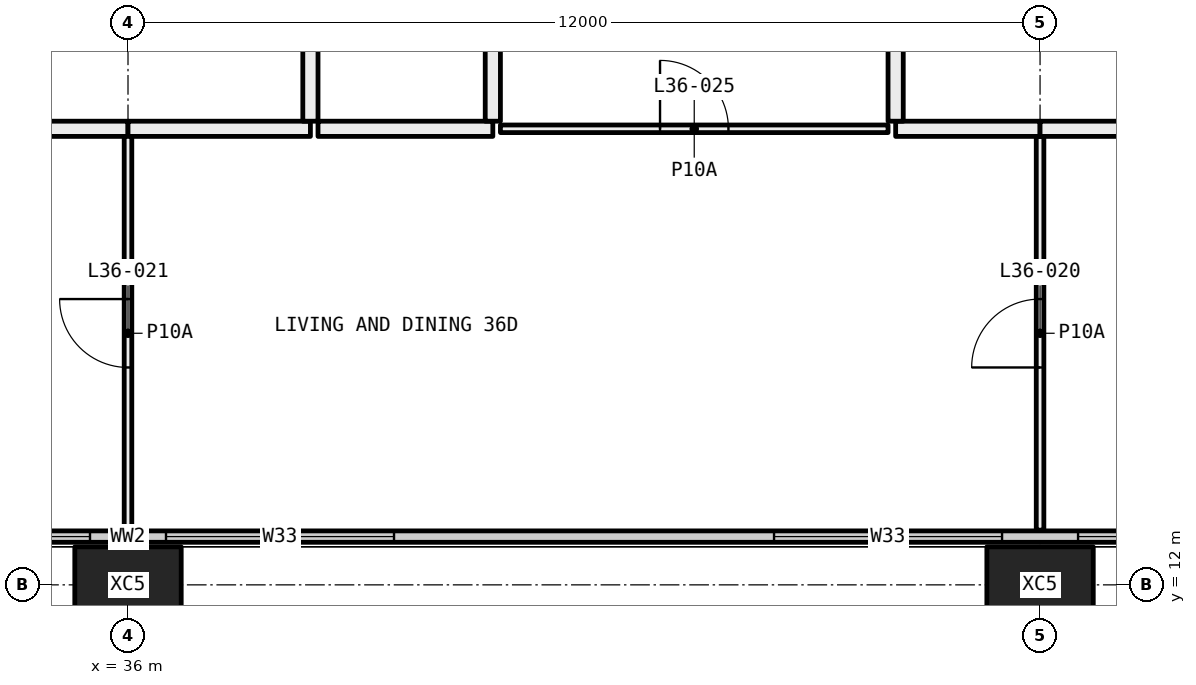
"""IFC4 building model, lengths in metres.
Left out: names, types, materials, properties, quantities, classifications, styles, units other than length and angle.
Written with IfcOpenShell. Run it as: python <this file> out.ifc"""

import sys

from ifc_helpers import new_model, si_unit, direction, frame, frame_2d, origin, origin_2d, place, context, subcontext, project, spatial, rectangle, hollow_rectangle, extrude, element, fill, save


model = new_model("IFC4")
c1 = context("Model", 3, precision=1e-05, world=origin(), true_north=direction((0.0, 1.0)))
c2 = subcontext(c1, "Body", "Model", "MODEL_VIEW")
j1 = project(units=[si_unit("LENGTHUNIT", "METRE"), si_unit("PLANEANGLEUNIT", "RADIAN")], contexts=[c1])
p1 = place(None, origin())
s1 = spatial("IfcSite", under=j1, at=p1, CompositionType="ELEMENT")
p2 = place(p1, origin())
s2 = spatial("IfcBuilding", under=s1, at=p2, CompositionType="ELEMENT")
p3 = place(p2, frame((0.0, 0.0, 138.0)))
s3 = spatial("IfcBuildingStorey", under=s2, at=p3, CompositionType="ELEMENT", Elevation=138.0)
for number, where, z_axis, x_axis in (
    (1, (36.0, 12.0, -0.4), (0.0, 0.0, 1.0), (1.0, 0.0, 0.0)),
    (2, (48.0, 12.0, -0.4), (0.0, 0.0, 1.0), (1.0, 0.0, 0.0)),
):
    element("IfcColumn", number, at=place(p3, frame(where, z_axis=z_axis, x_axis=x_axis)), inside=s3, PredefinedType="COLUMN", context=c2, shape_type="SweptSolid", body=[
        extrude(hollow_rectangle(XDim=1.4, YDim=1.0, WallThickness=0.055, at=origin_2d()), origin(), (0.0, 0.0, 1.0), 3.45),
    ])
p4 = place(p3, frame((6.56, 12.635, 0.0), z_axis=(0.0, 0.0, 1.0), x_axis=(1.0, 0.0, 0.0)))
e3 = element("IfcWall", 3, at=p4, inside=s3, PredefinedType="ELEMENTEDWALL", context=c2, shape_type="SweptSolid", body=[
    extrude(rectangle(XDim=58.88, YDim=0.15, at=frame_2d((29.44, 0.0))), origin(), (0.0, 0.0, 1.0), 3.05),
])
p5 = place(p4, frame((0.44, 0.0, 0.45)))
e4 = element("IfcOpeningElement", 4, at=p5, cuts=e3, PredefinedType="OPENING", context=c2, shape_type="SweptSolid", body=[
    extrude(rectangle(XDim=4.5, YDim=2.55, at=frame_2d((2.25, 1.275))), frame((0.0, 0.085, 0.0), z_axis=(0.0, -1.0, 0.0), x_axis=(1.0, 0.0, 0.0)), (0.0, 0.0, 1.0), 0.17),
])
p6 = place(p4, frame((5.94, 0.0, 0.45)))
e5 = element("IfcOpeningElement", 5, at=p6, cuts=e3, PredefinedType="OPENING", context=c2, shape_type="SweptSolid", body=[
    extrude(rectangle(XDim=3.0, YDim=2.55, at=frame_2d((1.5, 1.275))), frame((0.0, 0.085, 0.0), z_axis=(0.0, -1.0, 0.0), x_axis=(1.0, 0.0, 0.0)), (0.0, 0.0, 1.0), 0.17),
])
p7 = place(p4, frame((13.94, 0.0, 0.45)))
e6 = element("IfcOpeningElement", 6, at=p7, cuts=e3, PredefinedType="OPENING", context=c2, shape_type="SweptSolid", body=[
    extrude(rectangle(XDim=3.0, YDim=2.55, at=frame_2d((1.5, 1.275))), frame((0.0, 0.085, 0.0), z_axis=(0.0, -1.0, 0.0), x_axis=(1.0, 0.0, 0.0)), (0.0, 0.0, 1.0), 0.17),
])
p8 = place(p4, frame((17.94, 0.0, 0.45)))
e7 = element("IfcOpeningElement", 7, at=p8, cuts=e3, PredefinedType="OPENING", context=c2, shape_type="SweptSolid", body=[
    extrude(rectangle(XDim=3.0, YDim=2.55, at=frame_2d((1.5, 1.275))), frame((0.0, 0.085, 0.0), z_axis=(0.0, -1.0, 0.0), x_axis=(1.0, 0.0, 0.0)), (0.0, 0.0, 1.0), 0.17),
])
p9 = place(p4, frame((26.94, 0.0, 0.45)))
e8 = element("IfcOpeningElement", 8, at=p9, cuts=e3, PredefinedType="OPENING", context=c2, shape_type="SweptSolid", body=[
    extrude(rectangle(XDim=2.0, YDim=2.55, at=frame_2d((1.0, 1.275))), frame((0.0, 0.085, 0.0), z_axis=(0.0, -1.0, 0.0), x_axis=(1.0, 0.0, 0.0)), (0.0, 0.0, 1.0), 0.17),
])
p10 = place(p4, frame((29.94, 0.0, 0.45)))
e9 = element("IfcOpeningElement", 9, at=p10, cuts=e3, PredefinedType="OPENING", context=c2, shape_type="SweptSolid", body=[
    extrude(rectangle(XDim=3.0, YDim=2.55, at=frame_2d((1.5, 1.275))), frame((0.0, 0.085, 0.0), z_axis=(0.0, -1.0, 0.0), x_axis=(1.0, 0.0, 0.0)), (0.0, 0.0, 1.0), 0.17),
])
p11 = place(p4, frame((37.94, 0.0, 0.45)))
e10 = element("IfcOpeningElement", 10, at=p11, cuts=e3, PredefinedType="OPENING", context=c2, shape_type="SweptSolid", body=[
    extrude(rectangle(XDim=3.0, YDim=2.55, at=frame_2d((1.5, 1.275))), frame((0.0, 0.085, 0.0), z_axis=(0.0, -1.0, 0.0), x_axis=(1.0, 0.0, 0.0)), (0.0, 0.0, 1.0), 0.17),
])
p12 = place(p4, frame((41.94, 0.0, 0.45)))
e11 = element("IfcOpeningElement", 11, at=p12, cuts=e3, PredefinedType="OPENING", context=c2, shape_type="SweptSolid", body=[
    extrude(rectangle(XDim=3.0, YDim=2.55, at=frame_2d((1.5, 1.275))), frame((0.0, 0.085, 0.0), z_axis=(0.0, -1.0, 0.0), x_axis=(1.0, 0.0, 0.0)), (0.0, 0.0, 1.0), 0.17),
])
p13 = place(p4, frame((50.94, 0.0, 0.45)))
e12 = element("IfcOpeningElement", 12, at=p13, cuts=e3, PredefinedType="OPENING", context=c2, shape_type="SweptSolid", body=[
    extrude(rectangle(XDim=2.0, YDim=2.55, at=frame_2d((1.0, 1.275))), frame((0.0, 0.085, 0.0), z_axis=(0.0, -1.0, 0.0), x_axis=(1.0, 0.0, 0.0)), (0.0, 0.0, 1.0), 0.17),
])
p14 = place(p4, frame((53.94, 0.0, 0.45)))
e13 = element("IfcOpeningElement", 13, at=p14, cuts=e3, PredefinedType="OPENING", context=c2, shape_type="SweptSolid", body=[
    extrude(rectangle(XDim=4.5, YDim=2.55, at=frame_2d((2.25, 1.275))), frame((0.0, 0.085, 0.0), z_axis=(0.0, -1.0, 0.0), x_axis=(1.0, 0.0, 0.0)), (0.0, 0.0, 1.0), 0.17),
])
p15 = place(p3, frame((30.0, 18.0, 0.0), z_axis=(0.0, 0.0, 1.0), x_axis=(1.0, 0.0, 0.0)))
e14 = element("IfcWall", 14, at=p15, inside=s3, PredefinedType="PARTITIONING", context=c2, shape_type="SweptSolid", body=[
    extrude(rectangle(XDim=6.0, YDim=0.2, at=frame_2d((3.0, 0.0))), origin(), (0.0, 0.0, 1.0), 2.45),
])
p16 = place(p3, frame((36.0, 18.0, 0.0), z_axis=(0.0, 0.0, 1.0), x_axis=(1.0, 0.0, 0.0)))
e15 = element("IfcWall", 15, at=p16, inside=s3, PredefinedType="PARTITIONING", context=c2, shape_type="SweptSolid", body=[
    extrude(rectangle(XDim=2.4, YDim=0.2, at=frame_2d((1.2, 0.0))), origin(), (0.0, 0.0, 1.0), 2.45),
])
p17 = place(p3, frame((38.4, 18.1, 0.0), z_axis=(0.0, 0.0, 1.0), x_axis=(0.0, 1.0, 0.0)))
e16 = element("IfcWall", 16, at=p17, inside=s3, PredefinedType="PARTITIONING", context=c2, shape_type="SweptSolid", body=[
    extrude(rectangle(XDim=6.2, YDim=0.2, at=frame_2d((3.1, 0.0))), origin(), (0.0, 0.0, 1.0), 2.45),
])
p18 = place(p3, frame((36.0, 12.72, 0.0), z_axis=(0.0, 0.0, 1.0), x_axis=(0.0, 1.0, 0.0)))
e17 = element("IfcWall", 17, at=p18, inside=s3, PredefinedType="PARTITIONING", context=c2, shape_type="SweptSolid", body=[
    extrude(rectangle(XDim=5.18, YDim=0.1, at=frame_2d((2.59, 0.0))), origin(), (0.0, 0.0, 1.0), 2.45),
])
p19 = place(p18, frame((2.14, 0.0, 0.0)))
e18 = element("IfcOpeningElement", 18, at=p19, cuts=e17, PredefinedType="OPENING", context=c2, shape_type="SweptSolid", body=[
    extrude(rectangle(XDim=0.9, YDim=2.1, at=frame_2d((0.45, 1.05))), frame((0.0, 0.06, 0.0), z_axis=(0.0, -1.0, 0.0), x_axis=(1.0, 0.0, 0.0)), (0.0, 0.0, 1.0), 0.12),
])
p20 = place(p3, frame((48.0, 12.72, 0.0), z_axis=(0.0, 0.0, 1.0), x_axis=(0.0, 1.0, 0.0)))
e19 = element("IfcWall", 19, at=p20, inside=s3, PredefinedType="PARTITIONING", context=c2, shape_type="SweptSolid", body=[
    extrude(rectangle(XDim=5.18, YDim=0.1, at=frame_2d((2.59, 0.0))), origin(), (0.0, 0.0, 1.0), 3.05),
])
p21 = place(p20, frame((2.14, 0.0, 0.0)))
e20 = element("IfcOpeningElement", 20, at=p21, cuts=e19, PredefinedType="OPENING", context=c2, shape_type="SweptSolid", body=[
    extrude(rectangle(XDim=0.9, YDim=2.1, at=frame_2d((0.45, 1.05))), frame((0.0, 0.06, 0.0), z_axis=(0.0, -1.0, 0.0), x_axis=(1.0, 0.0, 0.0)), (0.0, 0.0, 1.0), 0.12),
])
p22 = place(p3, frame((46.0, 18.0, 0.0), z_axis=(0.0, 0.0, 1.0), x_axis=(-1.0, 0.0, 0.0)))
e21 = element("IfcWall", 21, at=p22, inside=s3, PredefinedType="PARTITIONING", context=c2, shape_type="SweptSolid", body=[
    extrude(rectangle(XDim=5.1, YDim=0.1, at=frame_2d((2.55, 0.0))), origin(), (0.0, 0.0, 1.0), 3.05),
])
p23 = place(p22, frame((2.1, 0.0, 0.0)))
e22 = element("IfcOpeningElement", 22, at=p23, cuts=e21, PredefinedType="OPENING", context=c2, shape_type="SweptSolid", body=[
    extrude(rectangle(XDim=0.9, YDim=2.1, at=frame_2d((0.45, 1.05))), frame((0.0, 0.06, 0.0), z_axis=(0.0, -1.0, 0.0), x_axis=(1.0, 0.0, 0.0)), (0.0, 0.0, 1.0), 0.12),
])
p24 = place(p3, frame((40.8, 18.0, 0.0), z_axis=(0.0, 0.0, 1.0), x_axis=(-1.0, 0.0, 0.0)))
e23 = element("IfcWall", 23, at=p24, inside=s3, PredefinedType="PARTITIONING", context=c2, shape_type="SweptSolid", body=[
    extrude(rectangle(XDim=2.3, YDim=0.2, at=frame_2d((1.15, 0.0))), origin(), (0.0, 0.0, 1.0), 3.05),
])
p25 = place(p3, frame((48.0, 18.0, 0.0), z_axis=(0.0, 0.0, 1.0), x_axis=(-1.0, 0.0, 0.0)))
e24 = element("IfcWall", 24, at=p25, inside=s3, PredefinedType="PARTITIONING", context=c2, shape_type="SweptSolid", body=[
    extrude(rectangle(XDim=1.9, YDim=0.2, at=frame_2d((0.95, 0.0))), origin(), (0.0, 0.0, 1.0), 3.05),
])
p26 = place(p3, frame((54.0, 18.0, 0.0), z_axis=(0.0, 0.0, 1.0), x_axis=(-1.0, 0.0, 0.0)))
e25 = element("IfcWall", 25, at=p26, inside=s3, PredefinedType="PARTITIONING", context=c2, shape_type="SweptSolid", body=[
    extrude(rectangle(XDim=6.0, YDim=0.2, at=frame_2d((3.0, 0.0))), origin(), (0.0, 0.0, 1.0), 3.05),
])
p27 = place(p26, frame((2.5, 0.0, 0.0)))
e26 = element("IfcOpeningElement", 26, at=p27, cuts=e25, PredefinedType="OPENING", context=c2, shape_type="SweptSolid", body=[
    extrude(rectangle(XDim=1.0, YDim=2.1, at=frame_2d((0.5, 1.05))), frame((0.0, 0.11, 0.0), z_axis=(0.0, -1.0, 0.0), x_axis=(1.0, 0.0, 0.0)), (0.0, 0.0, 1.0), 0.22),
])
p28 = place(p3, frame((40.8, 23.9, 0.0), z_axis=(0.0, 0.0, 1.0), x_axis=(0.0, -1.0, 0.0)))
e27 = element("IfcWall", 27, at=p28, inside=s3, PredefinedType="PARTITIONING", context=c2, shape_type="SweptSolid", body=[
    extrude(rectangle(XDim=5.8, YDim=0.2, at=frame_2d((2.9, 0.0))), origin(), (0.0, 0.0, 1.0), 3.05),
])
p29 = place(p3, frame((46.1, 18.1, 0.0), z_axis=(0.0, 0.0, 1.0), x_axis=(0.0, 1.0, 0.0)))
e28 = element("IfcWall", 28, at=p29, inside=s3, PredefinedType="PARTITIONING", context=c2, shape_type="SweptSolid", body=[
    extrude(rectangle(XDim=6.2, YDim=0.2, at=frame_2d((3.1, 0.0))), origin(), (0.0, 0.0, 1.0), 2.45),
])
p30 = place(p9, origin())
e29 = element("IfcWindow", 29, at=p30, inside=s3, PartitioningType="SINGLE_PANEL", PredefinedType="WINDOW", context=c2, shape_type="SweptSolid", body=[
    extrude(rectangle(XDim=2.0, YDim=2.55, at=frame_2d((1.0, 1.275))), frame((0.0, 0.03, 0.0), z_axis=(0.0, -1.0, 0.0), x_axis=(1.0, 0.0, 0.0)), (0.0, 0.0, 1.0), 0.06),
])
fill(e8, e29)
p31 = place(p10, origin())
e30 = element("IfcWindow", 30, at=p31, inside=s3, PartitioningType="SINGLE_PANEL", PredefinedType="WINDOW", context=c2, shape_type="SweptSolid", body=[
    extrude(rectangle(XDim=3.0, YDim=2.55, at=frame_2d((1.5, 1.275))), frame((0.0, 0.03, 0.0), z_axis=(0.0, -1.0, 0.0), x_axis=(1.0, 0.0, 0.0)), (0.0, 0.0, 1.0), 0.06),
])
fill(e9, e30)
p32 = place(p11, origin())
e31 = element("IfcWindow", 31, at=p32, inside=s3, PartitioningType="SINGLE_PANEL", PredefinedType="WINDOW", context=c2, shape_type="SweptSolid", body=[
    extrude(rectangle(XDim=3.0, YDim=2.55, at=frame_2d((1.5, 1.275))), frame((0.0, 0.03, 0.0), z_axis=(0.0, -1.0, 0.0), x_axis=(1.0, 0.0, 0.0)), (0.0, 0.0, 1.0), 0.06),
])
fill(e10, e31)
p33 = place(p12, origin())
e32 = element("IfcWindow", 32, at=p33, inside=s3, PartitioningType="SINGLE_PANEL", PredefinedType="WINDOW", context=c2, shape_type="SweptSolid", body=[
    extrude(rectangle(XDim=3.0, YDim=2.55, at=frame_2d((1.5, 1.275))), frame((0.0, 0.03, 0.0), z_axis=(0.0, -1.0, 0.0), x_axis=(1.0, 0.0, 0.0)), (0.0, 0.0, 1.0), 0.06),
])
fill(e11, e32)
p34 = place(p21, origin())
e33 = element("IfcDoor", 33, at=p34, inside=s3, OperationType="SINGLE_SWING_RIGHT", PredefinedType="DOOR", context=c2, shape_type="SweptSolid", body=[
    extrude(rectangle(XDim=0.9, YDim=2.1, at=frame_2d((0.45, 1.05))), frame((0.0, 0.025, 0.0), z_axis=(0.0, -1.0, 0.0), x_axis=(1.0, 0.0, 0.0)), (0.0, 0.0, 1.0), 0.05),
])
fill(e20, e33)
p35 = place(p19, origin())
e34 = element("IfcDoor", 34, at=p35, inside=s3, OperationType="SINGLE_SWING_LEFT", PredefinedType="DOOR", context=c2, shape_type="SweptSolid", body=[
    extrude(rectangle(XDim=0.9, YDim=2.1, at=frame_2d((0.45, 1.05))), frame((0.0, 0.025, 0.0), z_axis=(0.0, -1.0, 0.0), x_axis=(1.0, 0.0, 0.0)), (0.0, 0.0, 1.0), 0.05),
])
fill(e18, e34)
p36 = place(p23, frame((0.9, 0.0, 0.0), x_axis=(-1.0, 0.0, 0.0)))
e35 = element("IfcDoor", 35, at=p36, inside=s3, OperationType="SINGLE_SWING_RIGHT", PredefinedType="DOOR", context=c2, shape_type="SweptSolid", body=[
    extrude(rectangle(XDim=0.9, YDim=2.1, at=frame_2d((0.45, 1.05))), frame((0.0, 0.025, 0.0), z_axis=(0.0, -1.0, 0.0), x_axis=(1.0, 0.0, 0.0)), (0.0, 0.0, 1.0), 0.05),
])
fill(e22, e35)
save(model, sys.argv[1])
